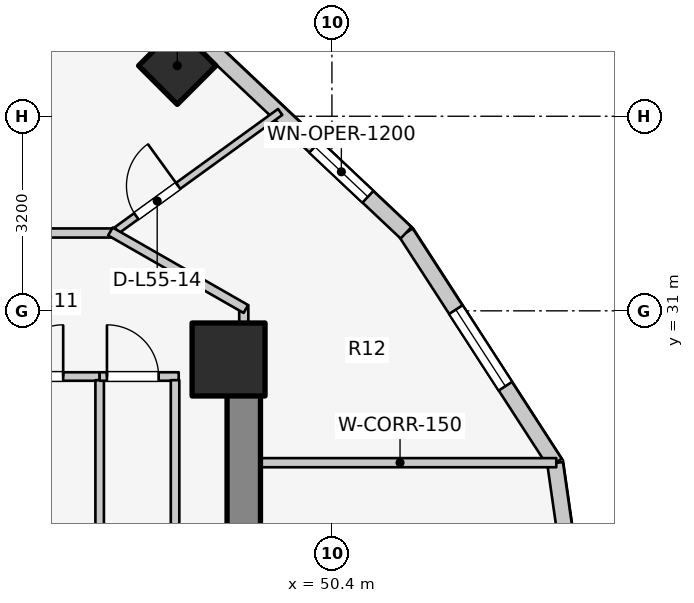
"""IFC4 building model, lengths in metres.
Left out: names, types, materials, properties, quantities, classifications, styles, units other than length and angle.
Written with IfcOpenShell. Run it as: python <this file> out.ifc"""

import sys

from ifc_helpers import new_model, si_unit, direction, frame, frame_2d, origin, origin_2d, place, context, subcontext, project, spatial, rectangle, extrude, element, fill, save


model = new_model("IFC4")
c1 = context("Model", 3, precision=1e-05, world=origin(), true_north=direction((0.0, 1.0)))
c2 = subcontext(c1, "Body", "Model", "MODEL_VIEW")
j1 = project(units=[si_unit("LENGTHUNIT", "METRE"), si_unit("PLANEANGLEUNIT", "RADIAN")], contexts=[c1])
p1 = place(None, origin())
s1 = spatial("IfcSite", under=j1, at=p1, CompositionType="ELEMENT")
p2 = place(p1, origin())
s2 = spatial("IfcBuilding", under=s1, at=p2, CompositionType="ELEMENT")
p3 = place(p2, frame((0.0, 0.0, 180.8)))
s3 = spatial("IfcBuildingStorey", under=s2, at=p3, CompositionType="ELEMENT", Elevation=180.8)
p4 = place(p3, frame((48.95, 17.05, 0.0), z_axis=(0.0, 0.0, 1.0), x_axis=(0.0, 1.0, 0.0)))
e1 = element("IfcWall", 1, at=p4, inside=s3, PredefinedType="SHEAR", context=c2, shape_type="SweptSolid", body=[
    extrude(rectangle(XDim=12.8, YDim=0.55, at=frame_2d((6.4, 0.0))), origin(), (0.0, 0.0, 1.0), 3.1),
])
p5 = place(p3, frame((48.7, 30.2, 0.0), z_axis=(0.0, 0.0, 1.0), x_axis=(1.0, 0.0, 0.0)))
e2 = element("IfcColumn", 2, at=p5, inside=s3, PredefinedType="COLUMN", context=c2, shape_type="SweptSolid", body=[
    extrude(rectangle(XDim=1.2, YDim=1.2, at=origin_2d()), origin(), (0.0, 0.0, 1.0), 3.1),
])
p6 = place(p3, frame((47.857, 35.031, 0.0), z_axis=(0.0, 0.0, 1.0), x_axis=(0.707106781187, 0.707106781187, 0.0)))
e3 = element("IfcColumn", 3, at=p6, inside=s3, PredefinedType="COLUMN", context=c2, shape_type="SweptSolid", body=[
    extrude(rectangle(XDim=0.9, YDim=0.9, at=origin_2d()), origin(), (0.0, 0.0, 1.0), 3.1),
])
p7 = place(p3, frame((54.86, 23.0, 0.0), z_axis=(0.0, 0.0, 1.0), x_axis=(-0.142227632286, 0.989833976288, 0.0)))
e4 = element("IfcWall", 4, at=p7, inside=s3, PredefinedType="STANDARD", context=c2, shape_type="SweptSolid", body=[
    extrude(rectangle(XDim=5.553, YDim=0.26, at=frame_2d((2.776, 0.0))), origin(), (0.0, 0.0, 1.0), 2.85),
])
p8 = place(p7, frame((2.027, 0.0, 0.75)))
e5 = element("IfcOpeningElement", 5, at=p8, cuts=e4, PredefinedType="OPENING", context=c2, shape_type="SweptSolid", body=[
    extrude(rectangle(XDim=1.5, YDim=1.6, at=frame_2d((0.75, 0.8))), frame((0.0, 0.14, 0.0), z_axis=(0.0, -1.0, 0.0), x_axis=(1.0, 0.0, 0.0)), (0.0, 0.0, 1.0), 0.28),
])
p9 = place(p3, frame((54.07, 28.497, 0.0), z_axis=(0.0, 0.0, 1.0), x_axis=(-0.543358984534, 0.839500454989, 0.0)))
e6 = element("IfcWall", 6, at=p9, inside=s3, PredefinedType="STANDARD", context=c2, shape_type="SweptSolid", body=[
    extrude(rectangle(XDim=4.511, YDim=0.26, at=frame_2d((2.256, 0.0))), origin(), (0.0, 0.0, 1.0), 2.85),
])
p10 = place(p9, frame((1.506, 0.0, 0.75)))
e7 = element("IfcOpeningElement", 7, at=p10, cuts=e6, PredefinedType="OPENING", context=c2, shape_type="SweptSolid", body=[
    extrude(rectangle(XDim=1.5, YDim=1.6, at=frame_2d((0.75, 0.8))), frame((0.0, 0.14, 0.0), z_axis=(0.0, -1.0, 0.0), x_axis=(1.0, 0.0, 0.0)), (0.0, 0.0, 1.0), 0.28),
])
p11 = place(p3, frame((51.619, 32.284, 0.0), z_axis=(0.0, 0.0, 1.0), x_axis=(-0.727667301037, 0.68593024354, 0.0)))
e8 = element("IfcWall", 8, at=p11, inside=s3, PredefinedType="STANDARD", context=c2, shape_type="SweptSolid", body=[
    extrude(rectangle(XDim=4.604, YDim=0.26, at=frame_2d((2.302, 0.0))), origin(), (0.0, 0.0, 1.0), 2.85),
])
p12 = place(p11, frame((0.862, 0.0, 0.75)))
e9 = element("IfcOpeningElement", 9, at=p12, cuts=e8, PredefinedType="OPENING", context=c2, shape_type="SweptSolid", body=[
    extrude(rectangle(XDim=1.2, YDim=1.5, at=frame_2d((0.6, 0.75))), frame((0.0, 0.14, 0.0), z_axis=(0.0, -1.0, 0.0), x_axis=(1.0, 0.0, 0.0)), (0.0, 0.0, 1.0), 0.28),
])
p13 = place(p3, frame((44.58, 29.92, 0.0), z_axis=(0.0, 0.0, 1.0), x_axis=(1.0, 0.0, 0.0)))
e10 = element("IfcWall", 10, at=p13, inside=s3, PredefinedType="PLUMBINGWALL", context=c2, shape_type="SweptSolid", body=[
    extrude(rectangle(XDim=2.0, YDim=0.14, at=frame_2d((1.0, 0.0))), origin(), (0.0, 0.0, 1.0), 2.855),
])
p14 = place(p13, frame((0.55, 0.0, 0.0)))
e11 = element("IfcOpeningElement", 11, at=p14, cuts=e10, PredefinedType="OPENING", context=c2, shape_type="SweptSolid", body=[
    extrude(rectangle(XDim=0.85, YDim=2.05, at=frame_2d((0.425, 1.025))), frame((0.0, 0.08, 0.0), z_axis=(0.0, -1.0, 0.0), x_axis=(1.0, 0.0, 0.0)), (0.0, 0.0, 1.0), 0.16),
])
p15 = place(p3, frame((46.58, 25.98, 0.0), z_axis=(0.0, 0.0, 1.0), x_axis=(0.0, 1.0, 0.0)))
e12 = element("IfcWall", 12, at=p15, inside=s3, PredefinedType="PLUMBINGWALL", context=c2, shape_type="SweptSolid", body=[
    extrude(rectangle(XDim=3.88, YDim=0.14, at=frame_2d((1.94, 0.0))), origin(), (0.0, 0.0, 1.0), 2.855),
])
p16 = place(p3, frame((46.58, 29.92, 0.0), z_axis=(0.0, 0.0, 1.0), x_axis=(1.0, 0.0, 0.0)))
e13 = element("IfcWall", 13, at=p16, inside=s3, PredefinedType="PLUMBINGWALL", context=c2, shape_type="SweptSolid", body=[
    extrude(rectangle(XDim=1.3, YDim=0.14, at=frame_2d((0.65, 0.0))), origin(), (0.0, 0.0, 1.0), 2.855),
])
p17 = place(p16, frame((0.12, 0.0, 0.0)))
e14 = element("IfcOpeningElement", 14, at=p17, cuts=e13, PredefinedType="OPENING", context=c2, shape_type="SweptSolid", body=[
    extrude(rectangle(XDim=0.85, YDim=2.05, at=frame_2d((0.425, 1.025))), frame((0.0, 0.08, 0.0), z_axis=(0.0, -1.0, 0.0), x_axis=(1.0, 0.0, 0.0)), (0.0, 0.0, 1.0), 0.16),
])
p18 = place(p3, frame((47.82, 25.98, 0.0), z_axis=(0.0, 0.0, 1.0), x_axis=(0.0, 1.0, 0.0)))
e15 = element("IfcWall", 15, at=p18, inside=s3, PredefinedType="PLUMBINGWALL", context=c2, shape_type="SweptSolid", body=[
    extrude(rectangle(XDim=3.88, YDim=0.14, at=frame_2d((1.94, 0.0))), origin(), (0.0, 0.0, 1.0), 2.855),
])
p19 = place(p3, frame((48.95, 28.503, 0.0), z_axis=(0.0, 0.0, 1.0), x_axis=(1.0, 0.0, 0.0)))
e16 = element("IfcWall", 16, at=p19, inside=s3, PredefinedType="PARTITIONING", context=c2, shape_type="SweptSolid", body=[
    extrude(rectangle(XDim=5.14, YDim=0.15, at=frame_2d((2.57, 0.0))), origin(), (0.0, 0.0, 1.0), 2.855),
])
p20 = place(p3, frame((48.95, 29.8, 0.0), z_axis=(0.0, 0.0, 1.0), x_axis=(0.0, 1.0, 0.0)))
e17 = element("IfcWall", 17, at=p20, inside=s3, PredefinedType="PARTITIONING", context=c2, shape_type="SweptSolid", body=[
    extrude(rectangle(XDim=1.29, YDim=0.15, at=frame_2d((0.645, 0.0))), origin(), (0.0, 0.0, 1.0), 2.855),
])
p21 = place(p3, frame((46.76, 32.251, 0.0), z_axis=(0.0, 0.0, 1.0), x_axis=(0.80983526768, 0.58665734396, 0.0)))
e18 = element("IfcWall", 18, at=p21, inside=s3, PredefinedType="MOVABLE", context=c2, shape_type="SweptSolid", body=[
    extrude(rectangle(XDim=3.444, YDim=0.12, at=frame_2d((1.722, 0.0))), origin(), (0.0, 0.0, 1.0), 2.22),
])
p22 = place(p21, frame((0.522, 0.0, 0.0)))
e19 = element("IfcOpeningElement", 19, at=p22, cuts=e18, PredefinedType="OPENING", context=c2, shape_type="SweptSolid", body=[
    extrude(rectangle(XDim=0.85, YDim=2.05, at=frame_2d((0.425, 1.025))), frame((0.0, 0.07, 0.0), z_axis=(0.0, -1.0, 0.0), x_axis=(1.0, 0.0, 0.0)), (0.0, 0.0, 1.0), 0.14),
])
p23 = place(p3, frame((39.33, 32.28, 0.0), z_axis=(0.0, 0.0, 1.0), x_axis=(1.0, 0.0, 0.0)))
e20 = element("IfcWall", 20, at=p23, inside=s3, PredefinedType="PARTITIONING", context=c2, shape_type="SweptSolid", body=[
    extrude(rectangle(XDim=7.52, YDim=0.15, at=frame_2d((3.76, 0.0))), origin(), (0.0, 0.0, 1.0), 2.299),
])
p24 = place(p23, frame((5.22, 0.0, 0.0)))
e21 = element("IfcOpeningElement", 21, at=p24, cuts=e20, PredefinedType="OPENING", context=c2, shape_type="SweptSolid", body=[
    extrude(rectangle(XDim=0.9, YDim=2.1, at=frame_2d((0.45, 1.05))), frame((0.0, 0.085, 0.0), z_axis=(0.0, -1.0, 0.0), x_axis=(1.0, 0.0, 0.0)), (0.0, 0.0, 1.0), 0.17),
])
p25 = place(p3, frame((46.757, 32.305, 0.0), z_axis=(0.0, 0.0, 1.0), x_axis=(0.867991349648, -0.496579315857, 0.0)))
e22 = element("IfcWall", 22, at=p25, inside=s3, PredefinedType="PARTITIONING", context=c2, shape_type="SweptSolid", body=[
    extrude(rectangle(XDim=2.567, YDim=0.15, at=frame_2d((1.283, 0.0))), origin(), (0.0, 0.0, 1.0), 2.22),
])
p26 = place(p10, origin())
e23 = element("IfcWindow", 23, at=p26, inside=s3, PartitioningType="SINGLE_PANEL", PredefinedType="WINDOW", context=c2, shape_type="SweptSolid", body=[
    extrude(rectangle(XDim=1.5, YDim=1.6, at=frame_2d((0.75, 0.8))), frame((0.0, 0.03, 0.0), z_axis=(0.0, -1.0, 0.0), x_axis=(1.0, 0.0, 0.0)), (0.0, 0.0, 1.0), 0.06),
])
fill(e7, e23)
p27 = place(p12, origin())
e24 = element("IfcWindow", 24, at=p27, inside=s3, PartitioningType="SINGLE_PANEL", PredefinedType="WINDOW", context=c2, shape_type="SweptSolid", body=[
    extrude(rectangle(XDim=1.2, YDim=1.5, at=frame_2d((0.6, 0.75))), frame((0.0, 0.03, 0.0), z_axis=(0.0, -1.0, 0.0), x_axis=(1.0, 0.0, 0.0)), (0.0, 0.0, 1.0), 0.06),
])
fill(e9, e24)
p28 = place(p14, origin())
e25 = element("IfcDoor", 25, at=p28, inside=s3, OperationType="SINGLE_SWING_RIGHT", PredefinedType="DOOR", context=c2, shape_type="SweptSolid", body=[
    extrude(rectangle(XDim=0.85, YDim=2.05, at=frame_2d((0.425, 1.025))), frame((0.0, 0.025, 0.0), z_axis=(0.0, -1.0, 0.0), x_axis=(1.0, 0.0, 0.0)), (0.0, 0.0, 1.0), 0.05),
])
fill(e11, e25)
p29 = place(p17, origin())
e26 = element("IfcDoor", 26, at=p29, inside=s3, OperationType="SINGLE_SWING_LEFT", PredefinedType="DOOR", context=c2, shape_type="SweptSolid", body=[
    extrude(rectangle(XDim=0.85, YDim=2.05, at=frame_2d((0.425, 1.025))), frame((0.0, 0.025, 0.0), z_axis=(0.0, -1.0, 0.0), x_axis=(1.0, 0.0, 0.0)), (0.0, 0.0, 1.0), 0.05),
])
fill(e14, e26)
p30 = place(p22, origin())
e27 = element("IfcDoor", 27, at=p30, inside=s3, OperationType="SINGLE_SWING_RIGHT", PredefinedType="DOOR", context=c2, shape_type="SweptSolid", body=[
    extrude(rectangle(XDim=0.85, YDim=2.05, at=frame_2d((0.425, 1.025))), frame((0.0, 0.025, 0.0), z_axis=(0.0, -1.0, 0.0), x_axis=(1.0, 0.0, 0.0)), (0.0, 0.0, 1.0), 0.05),
])
fill(e19, e27)
save(model, sys.argv[1])
